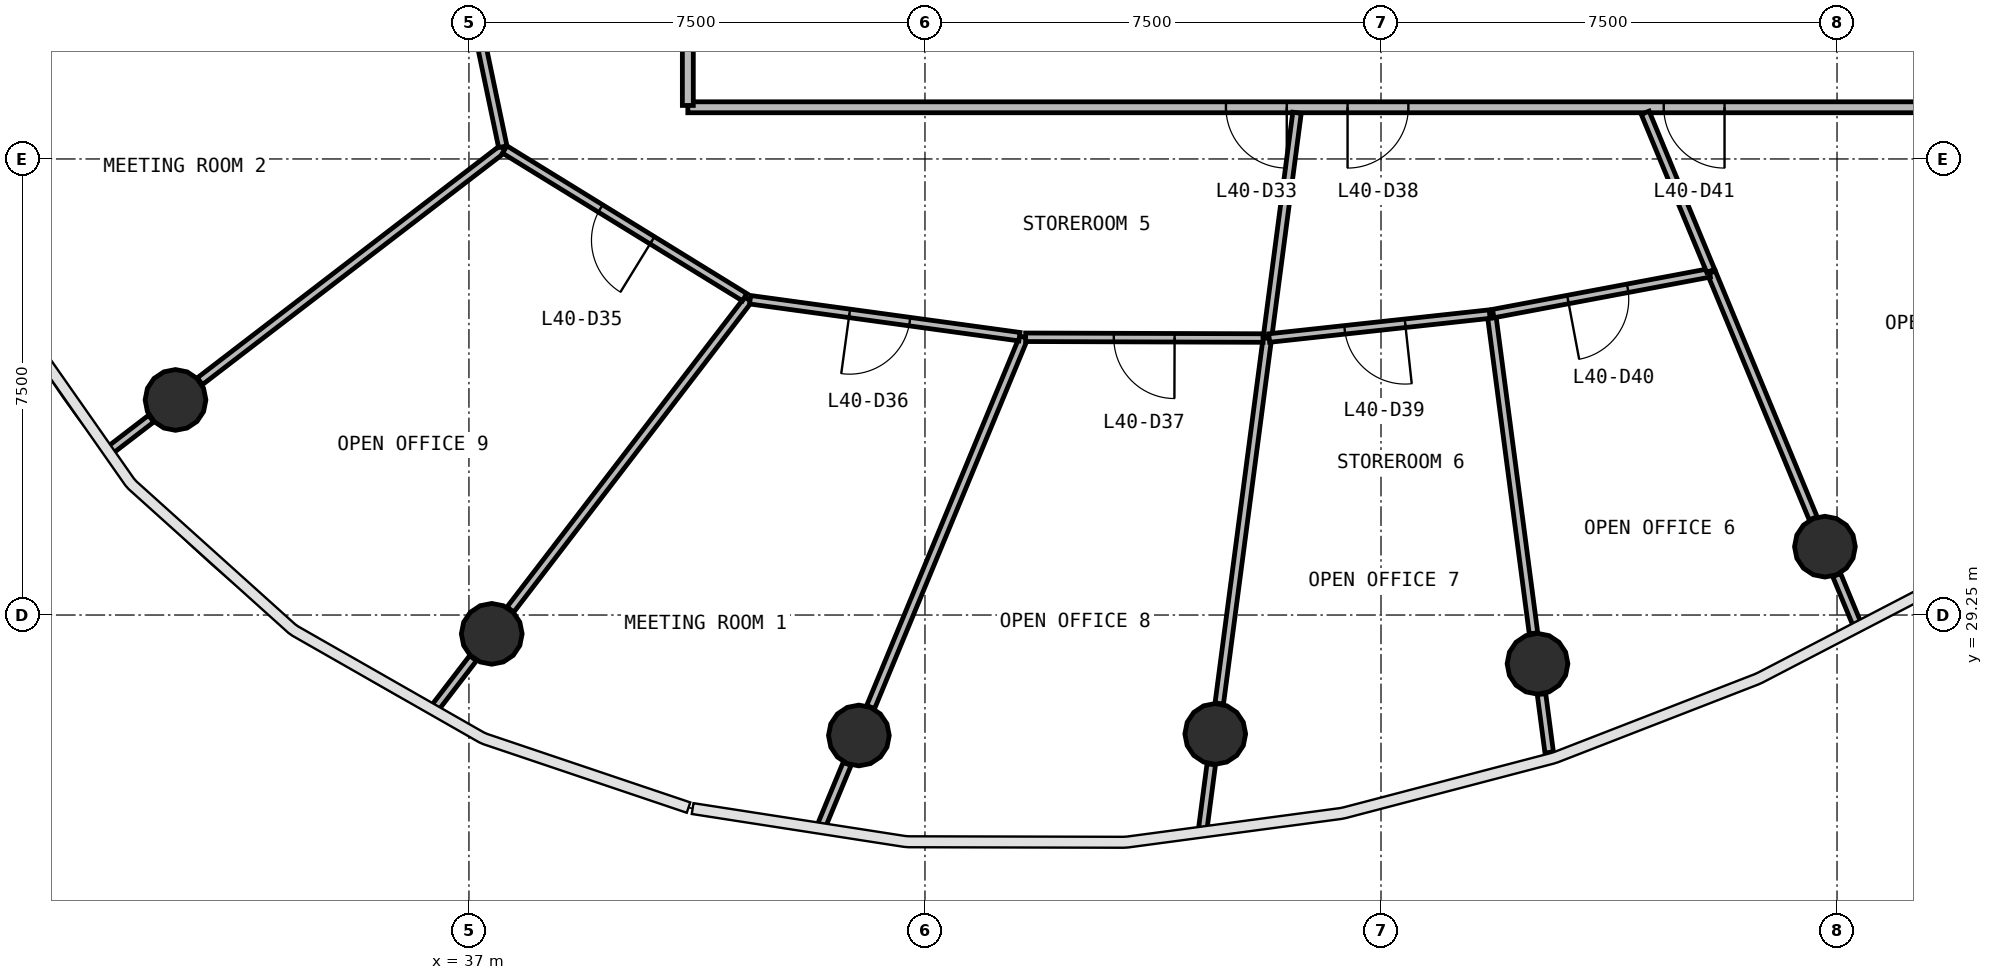
"""IFC4 building model, lengths in metres.
Left out: names, types, materials, properties, quantities, classifications, styles, units other than length and angle.
Written with IfcOpenShell. Run it as: python <this file> out.ifc"""

import sys

from ifc_helpers import new_model, si_unit, direction, frame, frame_2d, origin, origin_2d, place, context, subcontext, project, spatial, rectangle, circle, extrude, source, transform, mapped, element, fill, save


model = new_model("IFC4")
c1 = context("Model", 3, precision=1e-05, world=origin(), true_north=direction((0.0, 1.0)))
c2 = subcontext(c1, "Body", "Model", "MODEL_VIEW")
j1 = project(units=[si_unit("LENGTHUNIT", "METRE"), si_unit("PLANEANGLEUNIT", "RADIAN")], contexts=[c1])
p1 = place(None, origin())
s1 = spatial("IfcSite", under=j1, at=p1, CompositionType="ELEMENT")
p2 = place(p1, origin())
s2 = spatial("IfcBuilding", under=s1, at=p2, CompositionType="ELEMENT")
p3 = place(p2, frame((0.0, 0.0, 168.2)))
s3 = spatial("IfcBuildingStorey", under=s2, at=p3, CompositionType="ELEMENT", Elevation=168.2)
m1 = source(origin(), c2, "Body", "SweptSolid", [
    extrude(circle(Radius=0.5, at=origin_2d()), origin(), (0.0, 0.0, 1.0), 3.9),
])
for number, where, z_axis, x_axis in (
    (1, (32.174, 32.787, 0.0), (0.0, 0.0, 1.0), (1.0, 0.0, 0.0)),
    (2, (37.375, 28.94, 0.0), (0.0, 0.0, 1.0), (1.0, 0.0, 0.0)),
    (3, (43.413, 27.269, 0.0), (0.0, 0.0, 1.0), (1.0, 0.0, 0.0)),
    (4, (49.274, 27.295, 0.0), (0.0, 0.0, 1.0), (1.0, 0.0, 0.0)),
    (5, (54.574, 28.449, 0.0), (0.0, 0.0, 1.0), (1.0, 0.0, 0.0)),
    (6, (59.301, 30.374, 0.0), (0.0, 0.0, 1.0), (1.0, 0.0, 0.0)),
):
    element("IfcColumn", number, at=place(p3, frame(where, z_axis=z_axis, x_axis=x_axis)), inside=s3, PredefinedType="COLUMN", context=c2, shape_type="MappedRepresentation", body=[
        mapped(m1, transform((0.0, 0.0, 0.0), scale=1.0)),
    ])
p4 = place(p3, frame((63.4, 37.6, 0.0), z_axis=(0.0, 0.0, 1.0), x_axis=(-1.0, 0.0, 0.0)))
e7 = element("IfcWall", 7, at=p4, inside=s3, PredefinedType="PARTITIONING", context=c2, shape_type="SweptSolid", body=[
    extrude(rectangle(XDim=22.8, YDim=0.18, at=frame_2d((11.4, 0.0))), origin(), (0.0, 0.0, 1.0), 2.88),
])
p5 = place(p4, frame((12.95, 0.0, 0.0)))
e8 = element("IfcOpeningElement", 8, at=p5, cuts=e7, PredefinedType="OPENING", context=c2, shape_type="SweptSolid", body=[
    extrude(rectangle(XDim=1.0, YDim=2.1, at=frame_2d((0.5, 1.05))), frame((0.0, 0.1, 0.0), z_axis=(0.0, -1.0, 0.0), x_axis=(1.0, 0.0, 0.0)), (0.0, 0.0, 1.0), 0.2),
])
p6 = place(p4, frame((10.95, 0.0, 0.0)))
e9 = element("IfcOpeningElement", 9, at=p6, cuts=e7, PredefinedType="OPENING", context=c2, shape_type="SweptSolid", body=[
    extrude(rectangle(XDim=1.0, YDim=2.1, at=frame_2d((0.5, 1.05))), frame((0.0, 0.1, 0.0), z_axis=(0.0, -1.0, 0.0), x_axis=(1.0, 0.0, 0.0)), (0.0, 0.0, 1.0), 0.2),
])
p7 = place(p4, frame((5.75, 0.0, 0.0)))
e10 = element("IfcOpeningElement", 10, at=p7, cuts=e7, PredefinedType="OPENING", context=c2, shape_type="SweptSolid", body=[
    extrude(rectangle(XDim=1.0, YDim=2.1, at=frame_2d((0.5, 1.05))), frame((0.0, 0.1, 0.0), z_axis=(0.0, -1.0, 0.0), x_axis=(1.0, 0.0, 0.0)), (0.0, 0.0, 1.0), 0.2),
])
p8 = place(p3, frame((40.6, 37.63, 0.0), z_axis=(0.0, 0.0, 1.0), x_axis=(0.0, 1.0, 0.0)))
e11 = element("IfcWall", 11, at=p8, inside=s3, PredefinedType="PARTITIONING", context=c2, shape_type="SweptSolid", body=[
    extrude(rectangle(XDim=20.74, YDim=0.18, at=frame_2d((10.37, 0.0))), origin(), (0.0, 0.0, 1.0), 2.88),
])
p9 = place(p8, frame((12.09, 0.0, 0.0)))
e12 = element("IfcOpeningElement", 12, at=p9, cuts=e11, PredefinedType="OPENING", context=c2, shape_type="SweptSolid", body=[
    extrude(rectangle(XDim=1.0, YDim=2.1, at=frame_2d((0.5, 1.05))), frame((0.0, 0.1, 0.0), z_axis=(0.0, -1.0, 0.0), x_axis=(1.0, 0.0, 0.0)), (0.0, 0.0, 1.0), 0.2),
])
p10 = place(p8, frame((9.89, 0.0, 0.0)))
e13 = element("IfcOpeningElement", 13, at=p10, cuts=e11, PredefinedType="OPENING", context=c2, shape_type="SweptSolid", body=[
    extrude(rectangle(XDim=1.0, YDim=2.1, at=frame_2d((0.5, 1.05))), frame((0.0, 0.1, 0.0), z_axis=(0.0, -1.0, 0.0), x_axis=(1.0, 0.0, 0.0)), (0.0, 0.0, 1.0), 0.2),
])
p11 = place(p3, frame((46.125, 33.818, 0.0), z_axis=(0.0, 0.0, 1.0), x_axis=(-0.38267385781, -0.923883498364, 0.0)))
e14 = element("IfcWall", 14, at=p11, inside=s3, PredefinedType="PARTITIONING", context=c2, shape_type="SweptSolid", body=[
    extrude(rectangle(XDim=6.583, YDim=0.14, at=frame_2d((3.292, 0.0))), origin(), (0.0, 0.0, 1.0), 2.88),
])
p12 = place(p3, frame((41.594, 34.439, 0.0), z_axis=(0.0, 0.0, 1.0), x_axis=(-0.608759289162, -0.793354982249, 0.0)))
e15 = element("IfcWall", 15, at=p12, inside=s3, PredefinedType="PARTITIONING", context=c2, shape_type="SweptSolid", body=[
    extrude(rectangle(XDim=6.426, YDim=0.14, at=frame_2d((3.213, 0.0))), origin(), (0.0, 0.0, 1.0), 2.88),
])
p13 = place(p3, frame((37.563, 36.922, 0.0), z_axis=(0.0, 0.0, 1.0), x_axis=(-0.793368198418, -0.608742065032, 0.0)))
e16 = element("IfcWall", 16, at=p13, inside=s3, PredefinedType="PARTITIONING", context=c2, shape_type="SweptSolid", body=[
    extrude(rectangle(XDim=6.288, YDim=0.14, at=frame_2d((3.144, 0.0))), origin(), (0.0, 0.0, 1.0), 2.88),
])
p14 = place(p3, frame((50.131, 33.802, 0.0), z_axis=(0.0, 0.0, 1.0), x_axis=(-0.130558749059, -0.991440574641, 0.0)))
e17 = element("IfcWall", 17, at=p14, inside=s3, PredefinedType="PARTITIONING", context=c2, shape_type="SweptSolid", body=[
    extrude(rectangle(XDim=6.059, YDim=0.14, at=frame_2d((3.029, 0.0))), origin(), (0.0, 0.0, 1.0), 2.88),
])
p15 = place(p3, frame((53.816, 34.202, 0.0), z_axis=(0.0, 0.0, 1.0), x_axis=(0.130536754779, -0.991443470729, 0.0)))
e18 = element("IfcWall", 18, at=p15, inside=s3, PredefinedType="PARTITIONING", context=c2, shape_type="SweptSolid", body=[
    extrude(rectangle(XDim=5.299, YDim=0.14, at=frame_2d((2.649, 0.0))), origin(), (0.0, 0.0, 1.0), 2.88),
])
p16 = place(p3, frame((37.557, 36.951, 0.0), z_axis=(0.0, 0.0, 1.0), x_axis=(-0.204772935083, 0.978809503968, 0.0)))
e19 = element("IfcWall", 19, at=p16, inside=s3, PredefinedType="PARTITIONING", context=c2, shape_type="SweptSolid", body=[
    extrude(rectangle(XDim=4.763, YDim=0.14, at=frame_2d((2.381, 0.0))), origin(), (0.0, 0.0, 1.0), 2.88),
])
p17 = place(p16, frame((1.913, 0.0, 0.0)))
e20 = element("IfcOpeningElement", 20, at=p17, cuts=e19, PredefinedType="OPENING", context=c2, shape_type="SweptSolid", body=[
    extrude(rectangle(XDim=1.0, YDim=2.1, at=frame_2d((0.5, 1.05))), frame((0.0, 0.08, 0.0), z_axis=(0.0, -1.0, 0.0), x_axis=(1.0, 0.0, 0.0)), (0.0, 0.0, 1.0), 0.16),
])
p18 = place(p3, frame((41.534, 34.476, 0.0), z_axis=(0.0, 0.0, 1.0), x_axis=(-0.851519012553, 0.524323727539, 0.0)))
e21 = element("IfcWall", 21, at=p18, inside=s3, PredefinedType="PARTITIONING", context=c2, shape_type="SweptSolid", body=[
    extrude(rectangle(XDim=4.635, YDim=0.14, at=frame_2d((2.317, 0.0))), origin(), (0.0, 0.0, 1.0), 2.88),
])
p19 = place(p18, frame((1.784, 0.0, 0.0)))
e22 = element("IfcOpeningElement", 22, at=p19, cuts=e21, PredefinedType="OPENING", context=c2, shape_type="SweptSolid", body=[
    extrude(rectangle(XDim=1.0, YDim=2.1, at=frame_2d((0.5, 1.05))), frame((0.0, 0.08, 0.0), z_axis=(0.0, -1.0, 0.0), x_axis=(1.0, 0.0, 0.0)), (0.0, 0.0, 1.0), 0.16),
])
p20 = place(p3, frame((46.054, 33.828, 0.0), z_axis=(0.0, 0.0, 1.0), x_axis=(-0.99072887991, 0.135853916072, 0.0)))
e23 = element("IfcWall", 23, at=p20, inside=s3, PredefinedType="PARTITIONING", context=c2, shape_type="SweptSolid", body=[
    extrude(rectangle(XDim=4.471, YDim=0.14, at=frame_2d((2.236, 0.0))), origin(), (0.0, 0.0, 1.0), 2.88),
])
p21 = place(p20, frame((1.821, 0.0, 0.0)))
e24 = element("IfcOpeningElement", 24, at=p21, cuts=e23, PredefinedType="OPENING", context=c2, shape_type="SweptSolid", body=[
    extrude(rectangle(XDim=1.0, YDim=2.1, at=frame_2d((0.5, 1.05))), frame((0.0, 0.08, 0.0), z_axis=(0.0, -1.0, 0.0), x_axis=(1.0, 0.0, 0.0)), (0.0, 0.0, 1.0), 0.16),
])
p22 = place(p3, frame((57.434, 34.882, 0.0), z_axis=(0.0, 0.0, 1.0), x_axis=(0.382688609924, -0.923877387879, 0.0)))
e25 = element("IfcWall", 25, at=p22, inside=s3, PredefinedType="PARTITIONING", context=c2, shape_type="SweptSolid", body=[
    extrude(rectangle(XDim=4.375, YDim=0.14, at=frame_2d((2.187, 0.0))), origin(), (0.0, 0.0, 1.0), 2.88),
])
p23 = place(p3, frame((50.061, 33.805, 0.0), z_axis=(0.0, 0.0, 1.0), x_axis=(-0.999994916784, 0.003188480197, 0.0)))
e26 = element("IfcWall", 26, at=p23, inside=s3, PredefinedType="PARTITIONING", context=c2, shape_type="SweptSolid", body=[
    extrude(rectangle(XDim=3.905, YDim=0.14, at=frame_2d((1.953, 0.0))), origin(), (0.0, 0.0, 1.0), 2.88),
])
p24 = place(p23, frame((1.455, 0.0, 0.0)))
e27 = element("IfcOpeningElement", 27, at=p24, cuts=e26, PredefinedType="OPENING", context=c2, shape_type="SweptSolid", body=[
    extrude(rectangle(XDim=1.0, YDim=2.1, at=frame_2d((0.5, 1.05))), frame((0.0, 0.08, 0.0), z_axis=(0.0, -1.0, 0.0), x_axis=(1.0, 0.0, 0.0)), (0.0, 0.0, 1.0), 0.16),
])
p25 = place(p3, frame((50.619, 37.51, 0.0), z_axis=(0.0, 0.0, 1.0), x_axis=(-0.130478341519, -0.991451159863, 0.0)))
e28 = element("IfcWall", 28, at=p25, inside=s3, PredefinedType="PARTITIONING", context=c2, shape_type="SweptSolid", body=[
    extrude(rectangle(XDim=3.71, YDim=0.14, at=frame_2d((1.855, 0.0))), origin(), (0.0, 0.0, 1.0), 2.88),
])
p26 = place(p3, frame((53.787, 34.199, 0.0), z_axis=(0.0, 0.0, 1.0), x_axis=(-0.994154931326, -0.107962829343, 0.0)))
e29 = element("IfcWall", 29, at=p26, inside=s3, PredefinedType="PARTITIONING", context=c2, shape_type="SweptSolid", body=[
    extrude(rectangle(XDim=3.647, YDim=0.14, at=frame_2d((1.824, 0.0))), origin(), (0.0, 0.0, 1.0), 2.88),
])
p27 = place(p26, frame((1.397, 0.0, 0.0)))
e30 = element("IfcOpeningElement", 30, at=p27, cuts=e29, PredefinedType="OPENING", context=c2, shape_type="SweptSolid", body=[
    extrude(rectangle(XDim=1.0, YDim=2.1, at=frame_2d((0.5, 1.05))), frame((0.0, 0.08, 0.0), z_axis=(0.0, -1.0, 0.0), x_axis=(1.0, 0.0, 0.0)), (0.0, 0.0, 1.0), 0.16),
])
p28 = place(p3, frame((57.404, 34.877, 0.0), z_axis=(0.0, 0.0, 1.0), x_axis=(-0.982769740803, -0.184834078464, 0.0)))
e31 = element("IfcWall", 31, at=p28, inside=s3, PredefinedType="PARTITIONING", context=c2, shape_type="SweptSolid", body=[
    extrude(rectangle(XDim=3.621, YDim=0.14, at=frame_2d((1.81, 0.0))), origin(), (0.0, 0.0, 1.0), 2.88),
])
p29 = place(p28, frame((1.371, 0.0, 0.0)))
e32 = element("IfcOpeningElement", 32, at=p29, cuts=e31, PredefinedType="OPENING", context=c2, shape_type="SweptSolid", body=[
    extrude(rectangle(XDim=1.0, YDim=2.1, at=frame_2d((0.5, 1.05))), frame((0.0, 0.08, 0.0), z_axis=(0.0, -1.0, 0.0), x_axis=(1.0, 0.0, 0.0)), (0.0, 0.0, 1.0), 0.16),
])
p30 = place(p3, frame((56.345, 37.51, 0.0), z_axis=(0.0, 0.0, 1.0), x_axis=(0.382655706448, -0.923891016475, 0.0)))
e33 = element("IfcWall", 33, at=p30, inside=s3, PredefinedType="PARTITIONING", context=c2, shape_type="SweptSolid", body=[
    extrude(rectangle(XDim=2.814, YDim=0.14, at=frame_2d((1.407, 0.0))), origin(), (0.0, 0.0, 1.0), 2.88),
])
p31 = place(p3, frame((43.22, 26.802, 0.0), z_axis=(0.0, 0.0, 1.0), x_axis=(-0.382702652666, -0.923871570968, 0.0)))
e34 = element("IfcWall", 34, at=p31, inside=s3, PredefinedType="PARTITIONING", context=c2, shape_type="SweptSolid", body=[
    extrude(rectangle(XDim=1.106, YDim=0.14, at=frame_2d((0.553, 0.0))), origin(), (0.0, 0.0, 1.0), 2.88),
])
p32 = place(p3, frame((49.208, 26.795, 0.0), z_axis=(0.0, 0.0, 1.0), x_axis=(-0.130418875157, -0.991458984025, 0.0)))
e35 = element("IfcWall", 35, at=p32, inside=s3, PredefinedType="PARTITIONING", context=c2, shape_type="SweptSolid", body=[
    extrude(rectangle(XDim=1.063, YDim=0.14, at=frame_2d((0.532, 0.0))), origin(), (0.0, 0.0, 1.0), 2.88),
])
p33 = place(p3, frame((37.068, 28.54, 0.0), z_axis=(0.0, 0.0, 1.0), x_axis=(-0.608863825282, -0.793274758367, 0.0)))
e36 = element("IfcWall", 36, at=p33, inside=s3, PredefinedType="PARTITIONING", context=c2, shape_type="SweptSolid", body=[
    extrude(rectangle(XDim=1.031, YDim=0.14, at=frame_2d((0.516, 0.0))), origin(), (0.0, 0.0, 1.0), 2.88),
])
p34 = place(p3, frame((54.64, 27.948, 0.0), z_axis=(0.0, 0.0, 1.0), x_axis=(0.130591727785, -0.991436231249, 0.0)))
e37 = element("IfcWall", 37, at=p34, inside=s3, PredefinedType="PARTITIONING", context=c2, shape_type="SweptSolid", body=[
    extrude(rectangle(XDim=0.967, YDim=0.14, at=frame_2d((0.483, 0.0))), origin(), (0.0, 0.0, 1.0), 2.88),
])
p35 = place(p3, frame((59.494, 29.908, 0.0), z_axis=(0.0, 0.0, 1.0), x_axis=(0.382636339827, -0.923899037473, 0.0)))
e38 = element("IfcWall", 38, at=p35, inside=s3, PredefinedType="PARTITIONING", context=c2, shape_type="SweptSolid", body=[
    extrude(rectangle(XDim=0.859, YDim=0.14, at=frame_2d((0.429, 0.0))), origin(), (0.0, 0.0, 1.0), 2.88),
])
p36 = place(p3, frame((31.774, 32.48, 0.0), z_axis=(0.0, 0.0, 1.0), x_axis=(-0.793315863556, -0.608810266529, 0.0)))
e39 = element("IfcWall", 39, at=p36, inside=s3, PredefinedType="PARTITIONING", context=c2, shape_type="SweptSolid", body=[
    extrude(rectangle(XDim=0.839, YDim=0.14, at=frame_2d((0.419, 0.0))), origin(), (0.0, 0.0, 1.0), 2.88),
])
m2 = source(origin(), c2, "Body", "SweptSolid", [
    extrude(rectangle(XDim=1.0, YDim=2.1, at=frame_2d((0.5, 1.05))), frame((0.0, 0.025, 0.0), z_axis=(0.0, -1.0, 0.0), x_axis=(1.0, 0.0, 0.0)), (0.0, 0.0, 1.0), 0.05),
])
p37 = place(p5, origin())
e40 = element("IfcDoor", 40, at=p37, inside=s3, OperationType="SINGLE_SWING_LEFT", PredefinedType="DOOR", context=c2, shape_type="MappedRepresentation", body=[
    mapped(m2, transform((0.0, 0.0, 0.0), scale=1.0)),
])
fill(e8, e40)
p38 = place(p19, origin())
e41 = element("IfcDoor", 41, at=p38, inside=s3, OperationType="SINGLE_SWING_LEFT", PredefinedType="DOOR", context=c2, shape_type="MappedRepresentation", body=[
    mapped(m2, transform((0.0, 0.0, 0.0), scale=1.0)),
])
fill(e22, e41)
p39 = place(p21, origin())
e42 = element("IfcDoor", 42, at=p39, inside=s3, OperationType="SINGLE_SWING_RIGHT", PredefinedType="DOOR", context=c2, shape_type="MappedRepresentation", body=[
    mapped(m2, transform((0.0, 0.0, 0.0), scale=1.0)),
])
fill(e24, e42)
p40 = place(p24, origin())
e43 = element("IfcDoor", 43, at=p40, inside=s3, OperationType="SINGLE_SWING_LEFT", PredefinedType="DOOR", context=c2, shape_type="MappedRepresentation", body=[
    mapped(m2, transform((0.0, 0.0, 0.0), scale=1.0)),
])
fill(e27, e43)
p41 = place(p6, origin())
e44 = element("IfcDoor", 44, at=p41, inside=s3, OperationType="SINGLE_SWING_RIGHT", PredefinedType="DOOR", context=c2, shape_type="MappedRepresentation", body=[
    mapped(m2, transform((0.0, 0.0, 0.0), scale=1.0)),
])
fill(e9, e44)
p42 = place(p27, origin())
e45 = element("IfcDoor", 45, at=p42, inside=s3, OperationType="SINGLE_SWING_LEFT", PredefinedType="DOOR", context=c2, shape_type="MappedRepresentation", body=[
    mapped(m2, transform((0.0, 0.0, 0.0), scale=1.0)),
])
fill(e30, e45)
p43 = place(p29, origin())
e46 = element("IfcDoor", 46, at=p43, inside=s3, OperationType="SINGLE_SWING_RIGHT", PredefinedType="DOOR", context=c2, shape_type="MappedRepresentation", body=[
    mapped(m2, transform((0.0, 0.0, 0.0), scale=1.0)),
])
fill(e32, e46)
p44 = place(p7, origin())
e47 = element("IfcDoor", 47, at=p44, inside=s3, OperationType="SINGLE_SWING_LEFT", PredefinedType="DOOR", context=c2, shape_type="MappedRepresentation", body=[
    mapped(m2, transform((0.0, 0.0, 0.0), scale=1.0)),
])
fill(e10, e47)
save(model, sys.argv[1])
